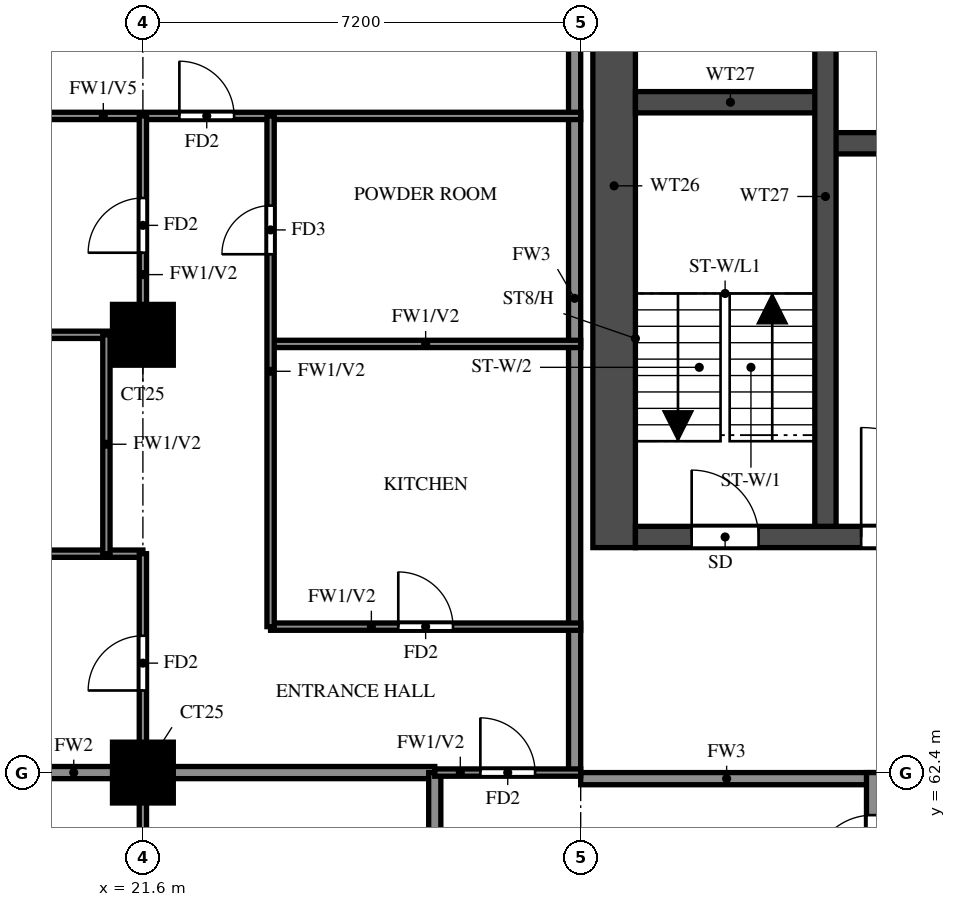
"""IFC4 building model, lengths in metres.
Left out: names, types, materials, properties, quantities, classifications, styles, units other than length and angle.
Written with IfcOpenShell. Run it as: python <this file> out.ifc"""

import sys

from ifc_helpers import new_model, si_unit, direction, frame, frame_2d, origin, origin_2d, place, context, subcontext, project, spatial, rectangle, extrude, source, transform, mapped, element, fill, save


model = new_model("IFC4")
c1 = context("Model", 3, precision=1e-05, world=origin(), true_north=direction((0.0, 1.0)))
c2 = subcontext(c1, "Body", "Model", "MODEL_VIEW")
j1 = project(units=[si_unit("LENGTHUNIT", "METRE"), si_unit("PLANEANGLEUNIT", "RADIAN")], contexts=[c1])
p1 = place(None, origin())
s1 = spatial("IfcSite", under=j1, at=p1, CompositionType="ELEMENT")
p2 = place(p1, origin())
s2 = spatial("IfcBuilding", under=s1, at=p2, CompositionType="ELEMENT")
p3 = place(p2, frame((0.0, 0.0, 171.0)))
s3 = spatial("IfcBuildingStorey", under=s2, at=p3, CompositionType="ELEMENT", Elevation=171.0)
m1 = source(origin(), c2, "Body", "SweptSolid", [
    extrude(rectangle(XDim=1.0, YDim=1.0, at=origin_2d()), origin(), (0.0, 0.0, 1.0), 3.2),
])
for number, where, z_axis, x_axis in (
    (1, (21.6, 62.4, 0.0), (0.0, 0.0, 1.0), (1.0, 0.0, 0.0)),
    (2, (21.6, 69.6, 0.0), (0.0, 0.0, 1.0), (1.0, 0.0, 0.0)),
):
    element("IfcColumn", number, at=place(p3, frame(where, z_axis=z_axis, x_axis=x_axis)), inside=s3, PredefinedType="COLUMN", context=c2, shape_type="MappedRepresentation", body=[
        mapped(m1, transform((0.0, 0.0, 0.0))),
    ])
p4 = place(p3, frame((29.35, 66.1, 0.0), z_axis=(0.0, 0.0, 1.0), x_axis=(0.0, 1.0, 0.0)))
e3 = element("IfcWall", 3, at=p4, inside=s3, PredefinedType="SHEAR", context=c2, shape_type="SweptSolid", body=[
    extrude(rectangle(XDim=11.9, YDim=0.7, at=frame_2d((5.95, 0.0))), origin(), (0.0, 0.0, 1.0), 3.2),
])
p5 = place(p3, frame((29.7, 66.275, 0.0), z_axis=(0.0, 0.0, 1.0), x_axis=(1.0, 0.0, 0.0)))
e4 = element("IfcWall", 4, at=p5, inside=s3, PredefinedType="SHEAR", context=c2, shape_type="SweptSolid", body=[
    extrude(rectangle(XDim=41.4, YDim=0.35, at=frame_2d((20.7, 0.0))), origin(), (0.0, 0.0, 1.0), 3.2),
])
p6 = place(p5, frame((0.925, 0.0, 0.0)))
e5 = element("IfcOpeningElement", 5, at=p6, cuts=e4, PredefinedType="OPENING", context=c2, shape_type="SweptSolid", body=[
    extrude(rectangle(XDim=1.1, YDim=2.1, at=frame_2d((0.55, 1.05))), frame((0.0, 0.185, 0.0), z_axis=(0.0, -1.0, 0.0), x_axis=(1.0, 0.0, 0.0)), (0.0, 0.0, 1.0), 0.37),
])
p7 = place(p5, frame((3.712, 0.0, 0.0)))
e6 = element("IfcOpeningElement", 6, at=p7, cuts=e4, PredefinedType="OPENING", context=c2, shape_type="SweptSolid", body=[
    extrude(rectangle(XDim=1.8, YDim=2.1, at=frame_2d((0.9, 1.05))), frame((0.0, 0.185, 0.0), z_axis=(0.0, -1.0, 0.0), x_axis=(1.0, 0.0, 0.0)), (0.0, 0.0, 1.0), 0.37),
])
p8 = place(p3, frame((32.825, 72.75, 0.0), z_axis=(0.0, 0.0, 1.0), x_axis=(1.0, 0.0, 0.0)))
e7 = element("IfcWall", 7, at=p8, inside=s3, PredefinedType="SHEAR", context=c2, shape_type="SweptSolid", body=[
    extrude(rectangle(XDim=35.15, YDim=0.35, at=frame_2d((17.575, 0.0))), origin(), (0.0, 0.0, 1.0), 3.2),
])
p9 = place(p8, frame((19.8, 0.0, 0.0)))
e8 = element("IfcOpeningElement", 8, at=p9, cuts=e7, PredefinedType="OPENING", context=c2, shape_type="SweptSolid", body=[
    extrude(rectangle(XDim=1.1, YDim=2.1, at=frame_2d((0.55, 1.05))), frame((0.0, 0.185, 0.0), z_axis=(0.0, -1.0, 0.0), x_axis=(1.0, 0.0, 0.0)), (0.0, 0.0, 1.0), 0.37),
])
p10 = place(p8, frame((27.7, 0.0, 0.0)))
e9 = element("IfcOpeningElement", 9, at=p10, cuts=e7, PredefinedType="OPENING", context=c2, shape_type="SweptSolid", body=[
    extrude(rectangle(XDim=1.1, YDim=2.1, at=frame_2d((0.55, 1.05))), frame((0.0, 0.185, 0.0), z_axis=(0.0, -1.0, 0.0), x_axis=(1.0, 0.0, 0.0)), (0.0, 0.0, 1.0), 0.37),
])
p11 = place(p8, frame((30.3, 0.0, 0.0)))
e10 = element("IfcOpeningElement", 10, at=p11, cuts=e7, PredefinedType="OPENING", context=c2, shape_type="SweptSolid", body=[
    extrude(rectangle(XDim=1.1, YDim=2.1, at=frame_2d((0.55, 1.05))), frame((0.0, 0.185, 0.0), z_axis=(0.0, -1.0, 0.0), x_axis=(1.0, 0.0, 0.0)), (0.0, 0.0, 1.0), 0.37),
])
p12 = place(p8, frame((3.8, 0.0, 0.0)))
e11 = element("IfcOpeningElement", 11, at=p12, cuts=e7, PredefinedType="OPENING", context=c2, shape_type="SweptSolid", body=[
    extrude(rectangle(XDim=1.1, YDim=2.1, at=frame_2d((0.55, 1.05))), frame((0.0, 0.185, 0.0), z_axis=(0.0, -1.0, 0.0), x_axis=(1.0, 0.0, 0.0)), (0.0, 0.0, 1.0), 0.37),
])
p13 = place(p8, frame((6.55, 0.0, 0.0)))
e12 = element("IfcOpeningElement", 12, at=p13, cuts=e7, PredefinedType="OPENING", context=c2, shape_type="SweptSolid", body=[
    extrude(rectangle(XDim=1.1, YDim=2.1, at=frame_2d((0.55, 1.05))), frame((0.0, 0.185, 0.0), z_axis=(0.0, -1.0, 0.0), x_axis=(1.0, 0.0, 0.0)), (0.0, 0.0, 1.0), 0.37),
])
p14 = place(p8, frame((9.3, 0.0, 0.0)))
e13 = element("IfcOpeningElement", 13, at=p14, cuts=e7, PredefinedType="OPENING", context=c2, shape_type="SweptSolid", body=[
    extrude(rectangle(XDim=1.1, YDim=2.1, at=frame_2d((0.55, 1.05))), frame((0.0, 0.185, 0.0), z_axis=(0.0, -1.0, 0.0), x_axis=(1.0, 0.0, 0.0)), (0.0, 0.0, 1.0), 0.37),
])
p15 = place(p8, frame((12.05, 0.0, 0.0)))
e14 = element("IfcOpeningElement", 14, at=p15, cuts=e7, PredefinedType="OPENING", context=c2, shape_type="SweptSolid", body=[
    extrude(rectangle(XDim=1.1, YDim=2.1, at=frame_2d((0.55, 1.05))), frame((0.0, 0.185, 0.0), z_axis=(0.0, -1.0, 0.0), x_axis=(1.0, 0.0, 0.0)), (0.0, 0.0, 1.0), 0.37),
])
p16 = place(p8, frame((14.8, 0.0, 0.0)))
e15 = element("IfcOpeningElement", 15, at=p16, cuts=e7, PredefinedType="OPENING", context=c2, shape_type="SweptSolid", body=[
    extrude(rectangle(XDim=1.1, YDim=2.1, at=frame_2d((0.55, 1.05))), frame((0.0, 0.185, 0.0), z_axis=(0.0, -1.0, 0.0), x_axis=(1.0, 0.0, 0.0)), (0.0, 0.0, 1.0), 0.37),
])
p17 = place(p8, frame((17.55, 0.0, 0.0)))
e16 = element("IfcOpeningElement", 16, at=p17, cuts=e7, PredefinedType="OPENING", context=c2, shape_type="SweptSolid", body=[
    extrude(rectangle(XDim=1.1, YDim=2.1, at=frame_2d((0.55, 1.05))), frame((0.0, 0.185, 0.0), z_axis=(0.0, -1.0, 0.0), x_axis=(1.0, 0.0, 0.0)), (0.0, 0.0, 1.0), 0.37),
])
p18 = place(p8, frame((0.938, 0.0, 0.0)))
e17 = element("IfcOpeningElement", 17, at=p18, cuts=e7, PredefinedType="OPENING", context=c2, shape_type="SweptSolid", body=[
    extrude(rectangle(XDim=1.1, YDim=2.1, at=frame_2d((0.55, 1.05))), frame((0.0, 0.185, 0.0), z_axis=(0.0, -1.0, 0.0), x_axis=(1.0, 0.0, 0.0)), (0.0, 0.0, 1.0), 0.37),
])
p19 = place(p3, frame((29.7, 73.425, 0.0), z_axis=(0.0, 0.0, 1.0), x_axis=(1.0, 0.0, 0.0)))
e18 = element("IfcWall", 18, at=p19, inside=s3, PredefinedType="SHEAR", context=c2, shape_type="SweptSolid", body=[
    extrude(rectangle(XDim=3.125, YDim=0.35, at=frame_2d((1.562, 0.0))), origin(), (0.0, 0.0, 1.0), 3.2),
])
p20 = place(p3, frame((32.825, 66.45, 0.0), z_axis=(0.0, 0.0, 1.0), x_axis=(0.0, 1.0, 0.0)))
e19 = element("IfcWall", 19, at=p20, inside=s3, PredefinedType="SHEAR", context=c2, shape_type="SweptSolid", body=[
    extrude(rectangle(XDim=10.85, YDim=0.35, at=frame_2d((5.425, 0.0))), origin(), (0.0, 0.0, 1.0), 3.2),
])
p21 = place(p3, frame((28.8, 62.3, 0.0), z_axis=(0.0, 0.0, 1.0), x_axis=(1.0, 0.0, 0.0)))
e20 = element("IfcWall", 20, at=p21, inside=s3, PredefinedType="SOLIDWALL", context=c2, shape_type="SweptSolid", body=[
    extrude(rectangle(XDim=4.8, YDim=0.2, at=frame_2d((2.4, 0.0))), origin(), (0.0, 0.0, 1.0), 3.2),
])
p22 = place(p3, frame((28.7, 62.4, 0.0), z_axis=(0.0, 0.0, 1.0), x_axis=(0.0, 1.0, 0.0)))
e21 = element("IfcWall", 21, at=p22, inside=s3, PredefinedType="SOLIDWALL", context=c2, shape_type="SweptSolid", body=[
    extrude(rectangle(XDim=15.6, YDim=0.2, at=frame_2d((7.8, 0.0))), origin(), (0.0, 0.0, 1.0), 3.2),
])
p23 = place(p3, frame((33.6, 60.0, 0.0), z_axis=(0.0, 0.0, 1.0), x_axis=(0.0, 1.0, 0.0)))
e22 = element("IfcWall", 22, at=p23, inside=s3, PredefinedType="SOLIDWALL", context=c2, shape_type="SweptSolid", body=[
    extrude(rectangle(XDim=2.4, YDim=0.2, at=frame_2d((1.2, 0.0))), origin(), (0.0, 0.0, 1.0), 3.2),
])
p24 = place(p23, frame((0.7, 0.0, 0.0)))
e23 = element("IfcOpeningElement", 23, at=p24, cuts=e22, PredefinedType="OPENING", context=c2, shape_type="SweptSolid", body=[
    extrude(rectangle(XDim=1.0, YDim=2.1, at=frame_2d((0.5, 1.05))), frame((0.0, 0.11, 0.0), z_axis=(0.0, -1.0, 0.0), x_axis=(1.0, 0.0, 0.0)), (0.0, 0.0, 1.0), 0.22),
])
p25 = place(p3, frame((14.525, 62.4, 0.0), z_axis=(0.0, 0.0, 1.0), x_axis=(1.0, 0.0, 0.0)))
e24 = element("IfcWall", 24, at=p25, inside=s3, PredefinedType="SOLIDWALL", context=c2, shape_type="SweptSolid", body=[
    extrude(rectangle(XDim=11.875, YDim=0.2, at=frame_2d((5.938, 0.0))), origin(), (0.0, 0.0, 1.0), 3.2),
])
p26 = place(p3, frame((26.4, 60.0, 0.0), z_axis=(0.0, 0.0, 1.0), x_axis=(0.0, 1.0, 0.0)))
e25 = element("IfcWall", 25, at=p26, inside=s3, PredefinedType="SOLIDWALL", context=c2, shape_type="SweptSolid", body=[
    extrude(rectangle(XDim=2.4, YDim=0.2, at=frame_2d((1.2, 0.0))), origin(), (0.0, 0.0, 1.0), 3.2),
])
p27 = place(p3, frame((26.4, 62.4, 0.0), z_axis=(0.0, 0.0, 1.0), x_axis=(1.0, 0.0, 0.0)))
e26 = element("IfcWall", 26, at=p27, inside=s3, PredefinedType="PARTITIONING", context=c2, shape_type="SweptSolid", body=[
    extrude(rectangle(XDim=2.4, YDim=0.12, at=frame_2d((1.2, 0.0))), origin(), (0.0, 0.0, 1.0), 3.2),
])
p28 = place(p27, frame((0.75, 0.0, 0.0)))
e27 = element("IfcOpeningElement", 27, at=p28, cuts=e26, PredefinedType="OPENING", context=c2, shape_type="SweptSolid", body=[
    extrude(rectangle(XDim=0.9, YDim=2.1, at=frame_2d((0.45, 1.05))), frame((0.0, 0.07, 0.0), z_axis=(0.0, -1.0, 0.0), x_axis=(1.0, 0.0, 0.0)), (0.0, 0.0, 1.0), 0.14),
])
p29 = place(p3, frame((23.7, 64.8, 0.0), z_axis=(0.0, 0.0, 1.0), x_axis=(1.0, 0.0, 0.0)))
e28 = element("IfcWall", 28, at=p29, inside=s3, PredefinedType="PARTITIONING", context=c2, shape_type="SweptSolid", body=[
    extrude(rectangle(XDim=5.1, YDim=0.12, at=frame_2d((2.55, 0.0))), origin(), (0.0, 0.0, 1.0), 3.2),
])
p30 = place(p29, frame((2.1, 0.0, 0.0)))
e29 = element("IfcOpeningElement", 29, at=p30, cuts=e28, PredefinedType="OPENING", context=c2, shape_type="SweptSolid", body=[
    extrude(rectangle(XDim=0.9, YDim=2.1, at=frame_2d((0.45, 1.05))), frame((0.0, 0.07, 0.0), z_axis=(0.0, -1.0, 0.0), x_axis=(1.0, 0.0, 0.0)), (0.0, 0.0, 1.0), 0.14),
])
p31 = place(p3, frame((14.525, 66.0, 0.0), z_axis=(0.0, 0.0, 1.0), x_axis=(1.0, 0.0, 0.0)))
e30 = element("IfcWall", 30, at=p31, inside=s3, PredefinedType="PARTITIONING", context=c2, shape_type="SweptSolid", body=[
    extrude(rectangle(XDim=7.075, YDim=0.12, at=frame_2d((3.538, 0.0))), origin(), (0.0, 0.0, 1.0), 2.3),
])
p32 = place(p31, frame((2.837, 0.0, 0.0)))
e31 = element("IfcOpeningElement", 31, at=p32, cuts=e30, PredefinedType="OPENING", context=c2, shape_type="SweptSolid", body=[
    extrude(rectangle(XDim=0.8, YDim=2.1, at=frame_2d((0.4, 1.05))), frame((0.0, 0.07, 0.0), z_axis=(0.0, -1.0, 0.0), x_axis=(1.0, 0.0, 0.0)), (0.0, 0.0, 1.0), 0.14),
])
p33 = place(p3, frame((23.7, 69.45, 0.0), z_axis=(0.0, 0.0, 1.0), x_axis=(1.0, 0.0, 0.0)))
e32 = element("IfcWall", 32, at=p33, inside=s3, PredefinedType="PARTITIONING", context=c2, shape_type="SweptSolid", body=[
    extrude(rectangle(XDim=5.1, YDim=0.12, at=frame_2d((2.55, 0.0))), origin(), (0.0, 0.0, 1.0), 3.2),
])
p34 = place(p3, frame((14.525, 69.6, 0.0), z_axis=(0.0, 0.0, 1.0), x_axis=(1.0, 0.0, 0.0)))
e33 = element("IfcWall", 33, at=p34, inside=s3, PredefinedType="PARTITIONING", context=c2, shape_type="SweptSolid", body=[
    extrude(rectangle(XDim=7.075, YDim=0.12, at=frame_2d((3.538, 0.0))), origin(), (0.0, 0.0, 1.0), 3.2),
])
p35 = place(p3, frame((14.525, 73.2, 0.0), z_axis=(0.0, 0.0, 1.0), x_axis=(1.0, 0.0, 0.0)))
e34 = element("IfcWall", 34, at=p35, inside=s3, PredefinedType="PARTITIONING", context=c2, shape_type="SweptSolid", body=[
    extrude(rectangle(XDim=14.275, YDim=0.12, at=frame_2d((7.138, 0.0))), origin(), (0.0, 0.0, 1.0), 2.3),
])
p36 = place(p35, frame((7.675, 0.0, 0.0)))
e35 = element("IfcOpeningElement", 35, at=p36, cuts=e34, PredefinedType="OPENING", context=c2, shape_type="SweptSolid", body=[
    extrude(rectangle(XDim=0.9, YDim=2.1, at=frame_2d((0.45, 1.05))), frame((0.0, 0.07, 0.0), z_axis=(0.0, -1.0, 0.0), x_axis=(1.0, 0.0, 0.0)), (0.0, 0.0, 1.0), 0.14),
])
p37 = place(p3, frame((21.0, 66.0, 0.0), z_axis=(0.0, 0.0, 1.0), x_axis=(0.0, 1.0, 0.0)))
e36 = element("IfcWall", 36, at=p37, inside=s3, PredefinedType="PARTITIONING", context=c2, shape_type="SweptSolid", body=[
    extrude(rectangle(XDim=3.6, YDim=0.12, at=frame_2d((1.8, 0.0))), origin(), (0.0, 0.0, 1.0), 3.2),
])
p38 = place(p3, frame((21.6, 55.2, 0.0), z_axis=(0.0, 0.0, 1.0), x_axis=(0.0, 1.0, 0.0)))
e37 = element("IfcWall", 37, at=p38, inside=s3, PredefinedType="PARTITIONING", context=c2, shape_type="SweptSolid", body=[
    extrude(rectangle(XDim=10.8, YDim=0.12, at=frame_2d((5.4, 0.0))), origin(), (0.0, 0.0, 1.0), 3.2),
])
p39 = place(p38, frame((2.85, 0.0, 0.0)))
e38 = element("IfcOpeningElement", 38, at=p39, cuts=e37, PredefinedType="OPENING", context=c2, shape_type="SweptSolid", body=[
    extrude(rectangle(XDim=1.5, YDim=2.1, at=frame_2d((0.75, 1.05))), frame((0.0, 0.07, 0.0), z_axis=(0.0, -1.0, 0.0), x_axis=(1.0, 0.0, 0.0)), (0.0, 0.0, 1.0), 0.14),
])
p40 = place(p38, frame((8.55, 0.0, 0.0)))
e39 = element("IfcOpeningElement", 39, at=p40, cuts=e37, PredefinedType="OPENING", context=c2, shape_type="SweptSolid", body=[
    extrude(rectangle(XDim=0.9, YDim=2.1, at=frame_2d((0.45, 1.05))), frame((0.0, 0.07, 0.0), z_axis=(0.0, -1.0, 0.0), x_axis=(1.0, 0.0, 0.0)), (0.0, 0.0, 1.0), 0.14),
])
p41 = place(p3, frame((21.6, 69.6, 0.0), z_axis=(0.0, 0.0, 1.0), x_axis=(0.0, 1.0, 0.0)))
e40 = element("IfcWall", 40, at=p41, inside=s3, PredefinedType="PARTITIONING", context=c2, shape_type="SweptSolid", body=[
    extrude(rectangle(XDim=3.6, YDim=0.12, at=frame_2d((1.8, 0.0))), origin(), (0.0, 0.0, 1.0), 3.2),
])
p42 = place(p41, frame((1.35, 0.0, 0.0)))
e41 = element("IfcOpeningElement", 41, at=p42, cuts=e40, PredefinedType="OPENING", context=c2, shape_type="SweptSolid", body=[
    extrude(rectangle(XDim=0.9, YDim=2.1, at=frame_2d((0.45, 1.05))), frame((0.0, 0.07, 0.0), z_axis=(0.0, -1.0, 0.0), x_axis=(1.0, 0.0, 0.0)), (0.0, 0.0, 1.0), 0.14),
])
p43 = place(p3, frame((23.7, 64.8, 0.0), z_axis=(0.0, 0.0, 1.0), x_axis=(0.0, 1.0, 0.0)))
e42 = element("IfcWall", 42, at=p43, inside=s3, PredefinedType="PARTITIONING", context=c2, shape_type="SweptSolid", body=[
    extrude(rectangle(XDim=8.4, YDim=0.12, at=frame_2d((4.2, 0.0))), origin(), (0.0, 0.0, 1.0), 3.2),
])
p44 = place(p43, frame((6.125, 0.0, 0.0)))
e43 = element("IfcOpeningElement", 43, at=p44, cuts=e42, PredefinedType="OPENING", context=c2, shape_type="SweptSolid", body=[
    extrude(rectangle(XDim=0.8, YDim=2.1, at=frame_2d((0.4, 1.05))), frame((0.0, 0.07, 0.0), z_axis=(0.0, -1.0, 0.0), x_axis=(1.0, 0.0, 0.0)), (0.0, 0.0, 1.0), 0.14),
])
p45 = place(p6, origin())
e44 = element("IfcDoor", 44, at=p45, inside=s3, OperationType="SINGLE_SWING_LEFT", PredefinedType="DOOR", context=c2, shape_type="SweptSolid", body=[
    extrude(rectangle(XDim=1.1, YDim=2.1, at=frame_2d((0.55, 1.05))), frame((0.0, 0.025, 0.0), z_axis=(0.0, -1.0, 0.0), x_axis=(1.0, 0.0, 0.0)), (0.0, 0.0, 1.0), 0.05),
])
fill(e5, e44)
p46 = place(p7, origin())
e45 = element("IfcDoor", 45, at=p46, inside=s3, OperationType="DOUBLE_DOOR_SINGLE_SWING", PredefinedType="DOOR", context=c2, shape_type="SweptSolid", body=[
    extrude(rectangle(XDim=1.8, YDim=2.1, at=frame_2d((0.9, 1.05))), frame((0.0, 0.025, 0.0), z_axis=(0.0, -1.0, 0.0), x_axis=(1.0, 0.0, 0.0)), (0.0, 0.0, 1.0), 0.05),
])
fill(e6, e45)
p47 = place(p28, origin())
e46 = element("IfcDoor", 46, at=p47, inside=s3, OperationType="SINGLE_SWING_RIGHT", PredefinedType="DOOR", context=c2, shape_type="SweptSolid", body=[
    extrude(rectangle(XDim=0.9, YDim=2.1, at=frame_2d((0.45, 1.05))), frame((0.0, 0.025, 0.0), z_axis=(0.0, -1.0, 0.0), x_axis=(1.0, 0.0, 0.0)), (0.0, 0.0, 1.0), 0.05),
])
fill(e27, e46)
p48 = place(p24, origin())
e47 = element("IfcDoor", 47, at=p48, inside=s3, OperationType="SINGLE_SWING_LEFT", PredefinedType="DOOR", context=c2, shape_type="SweptSolid", body=[
    extrude(rectangle(XDim=1.0, YDim=2.1, at=frame_2d((0.5, 1.05))), frame((0.0, 0.025, 0.0), z_axis=(0.0, -1.0, 0.0), x_axis=(1.0, 0.0, 0.0)), (0.0, 0.0, 1.0), 0.05),
])
fill(e23, e47)
p49 = place(p40, origin())
e48 = element("IfcDoor", 48, at=p49, inside=s3, OperationType="SINGLE_SWING_LEFT", PredefinedType="DOOR", context=c2, shape_type="SweptSolid", body=[
    extrude(rectangle(XDim=0.9, YDim=2.1, at=frame_2d((0.45, 1.05))), frame((0.0, 0.025, 0.0), z_axis=(0.0, -1.0, 0.0), x_axis=(1.0, 0.0, 0.0)), (0.0, 0.0, 1.0), 0.05),
])
fill(e39, e48)
p50 = place(p42, origin())
e49 = element("IfcDoor", 49, at=p50, inside=s3, OperationType="SINGLE_SWING_LEFT", PredefinedType="DOOR", context=c2, shape_type="SweptSolid", body=[
    extrude(rectangle(XDim=0.9, YDim=2.1, at=frame_2d((0.45, 1.05))), frame((0.0, 0.025, 0.0), z_axis=(0.0, -1.0, 0.0), x_axis=(1.0, 0.0, 0.0)), (0.0, 0.0, 1.0), 0.05),
])
fill(e41, e49)
p51 = place(p36, origin())
e50 = element("IfcDoor", 50, at=p51, inside=s3, OperationType="SINGLE_SWING_LEFT", PredefinedType="DOOR", context=c2, shape_type="SweptSolid", body=[
    extrude(rectangle(XDim=0.9, YDim=2.1, at=frame_2d((0.45, 1.05))), frame((0.0, 0.025, 0.0), z_axis=(0.0, -1.0, 0.0), x_axis=(1.0, 0.0, 0.0)), (0.0, 0.0, 1.0), 0.05),
])
fill(e35, e50)
p52 = place(p30, origin())
e51 = element("IfcDoor", 51, at=p52, inside=s3, OperationType="SINGLE_SWING_RIGHT", PredefinedType="DOOR", context=c2, shape_type="SweptSolid", body=[
    extrude(rectangle(XDim=0.9, YDim=2.1, at=frame_2d((0.45, 1.05))), frame((0.0, 0.025, 0.0), z_axis=(0.0, -1.0, 0.0), x_axis=(1.0, 0.0, 0.0)), (0.0, 0.0, 1.0), 0.05),
])
fill(e29, e51)
p53 = place(p44, origin())
e52 = element("IfcDoor", 52, at=p53, inside=s3, OperationType="SINGLE_SWING_LEFT", PredefinedType="DOOR", context=c2, shape_type="SweptSolid", body=[
    extrude(rectangle(XDim=0.8, YDim=2.1, at=frame_2d((0.4, 1.05))), frame((0.0, 0.025, 0.0), z_axis=(0.0, -1.0, 0.0), x_axis=(1.0, 0.0, 0.0)), (0.0, 0.0, 1.0), 0.05),
])
fill(e43, e52)
save(model, sys.argv[1])
